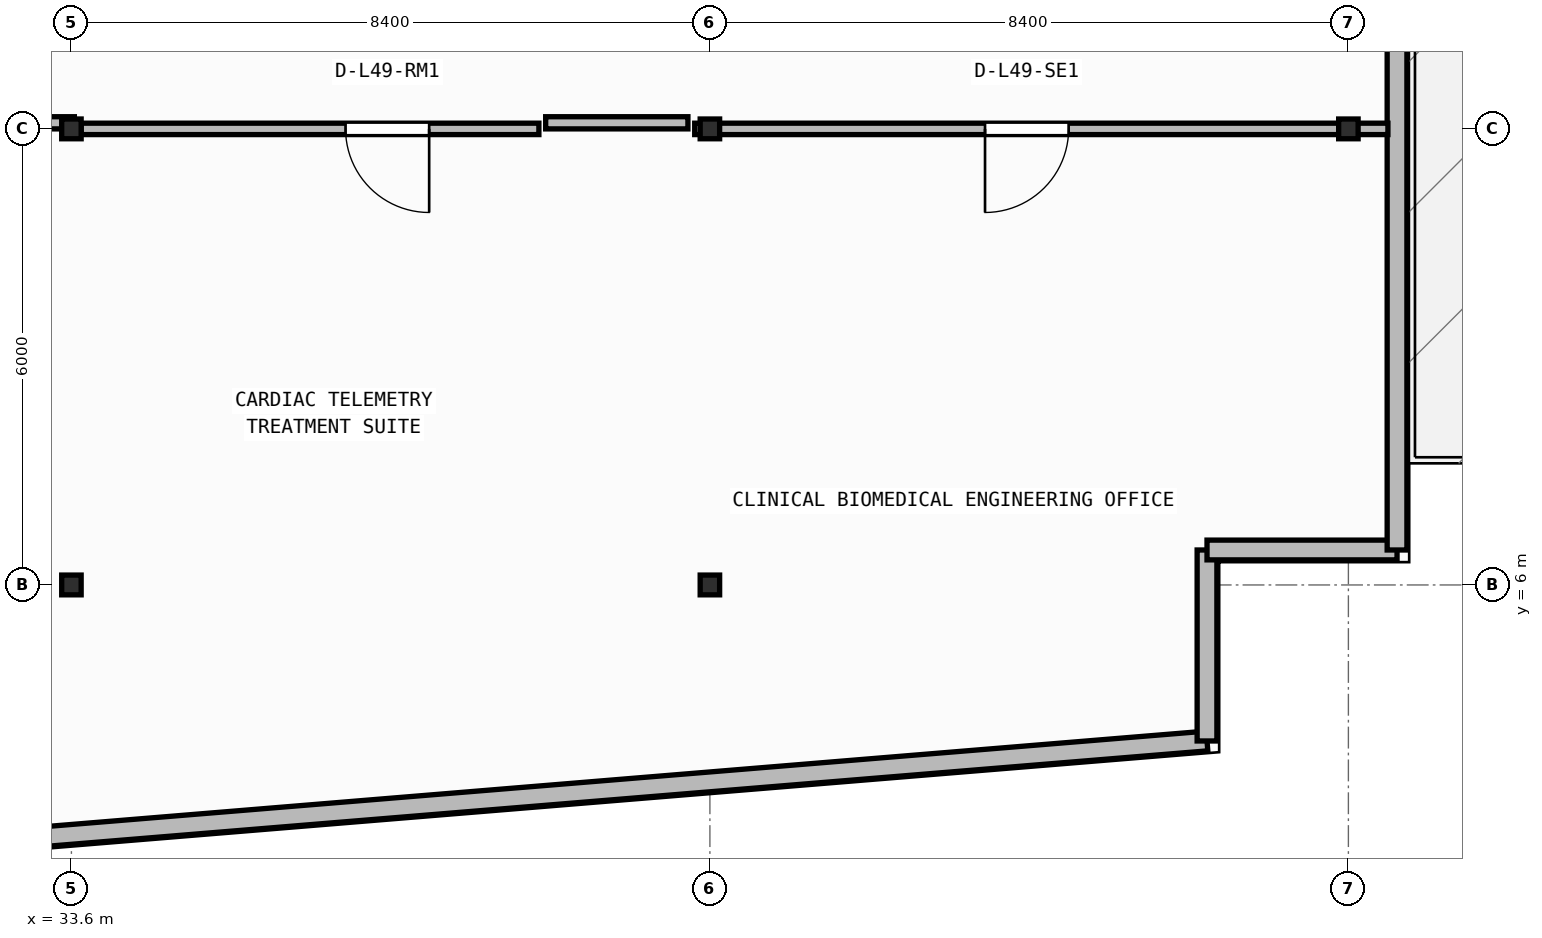
"""IFC4 building model, lengths in metres.
Left out: names, types, materials, properties, quantities, classifications, styles, units other than length and angle.
Written with IfcOpenShell. Run it as: python <this file> out.ifc"""

import sys

from ifc_helpers import new_model, si_unit, direction, frame, frame_2d, origin, origin_2d, place, context, subcontext, project, spatial, rectangle, i_section, extrude, element, fill, save


model = new_model("IFC4")
c1 = context("Model", 3, precision=1e-05, world=origin(), true_north=direction((0.0, 1.0)))
c2 = subcontext(c1, "Body", "Model", "MODEL_VIEW")
j1 = project(units=[si_unit("LENGTHUNIT", "METRE"), si_unit("PLANEANGLEUNIT", "RADIAN")], contexts=[c1])
p1 = place(None, origin())
s1 = spatial("IfcSite", under=j1, at=p1, CompositionType="ELEMENT")
p2 = place(p1, origin())
s2 = spatial("IfcBuilding", under=s1, at=p2, CompositionType="ELEMENT")
p3 = place(p2, frame((0.0, 0.0, 200.0)))
s3 = spatial("IfcBuildingStorey", under=s2, at=p3, CompositionType="ELEMENT", Elevation=200.0)
for number, where, z_axis, x_axis in (
    (1, (33.6, 6.0, 0.0), (0.0, 0.0, 1.0), (1.0, 0.0, 0.0)),
    (2, (42.0, 6.0, 0.0), (0.0, 0.0, 1.0), (1.0, 0.0, 0.0)),
    (3, (33.6, 12.0, 0.0), (0.0, 0.0, 1.0), (1.0, 0.0, 0.0)),
    (4, (42.0, 12.0, 0.0), (0.0, 0.0, 1.0), (1.0, 0.0, 0.0)),
    (5, (50.4, 12.0, 0.0), (0.0, 0.0, 1.0), (1.0, 0.0, 0.0)),
):
    element("IfcColumn", number, at=place(p3, frame(where, z_axis=z_axis, x_axis=x_axis)), inside=s3, PredefinedType="COLUMN", context=c2, shape_type="SweptSolid", body=[
        extrude(i_section(OverallWidth=0.256, OverallDepth=0.26, WebThickness=0.01, FlangeThickness=0.017, FilletRadius=0.013, at=origin_2d()), origin(), (0.0, 0.0, 1.0), 3.95),
    ])
p4 = place(p3, frame((2.66, 0.174, 0.0), z_axis=(0.0, 0.0, 1.0), x_axis=(0.996634028439, 0.081979347142, 0.0)))
e6 = element("IfcWall", 6, at=p4, inside=s3, PredefinedType="STANDARD", context=c2, shape_type="SweptSolid", body=[
    extrude(rectangle(XDim=46.035, YDim=0.26, at=frame_2d((23.018, 0.0))), origin(), (0.0, 0.0, 1.0), 3.71),
])
p5 = place(p4, frame((21.817, 0.0, 0.9)))
e7 = element("IfcOpeningElement", 7, at=p5, cuts=e6, PredefinedType="OPENING", context=c2, shape_type="SweptSolid", body=[
    extrude(rectangle(XDim=2.4, YDim=1.65, at=frame_2d((1.2, 0.825))), frame((0.0, 0.14, 0.0), z_axis=(0.0, -1.0, 0.0), x_axis=(1.0, 0.0, 0.0)), (0.0, 0.0, 1.0), 0.28),
])
p6 = place(p3, frame((48.54, 3.948, 0.0), z_axis=(0.0, 0.0, 1.0), x_axis=(0.0, 1.0, 0.0)))
e8 = element("IfcWall", 8, at=p6, inside=s3, PredefinedType="STANDARD", context=c2, shape_type="SweptSolid", body=[
    extrude(rectangle(XDim=2.512, YDim=0.26, at=frame_2d((1.256, 0.0))), origin(), (0.0, 0.0, 1.0), 3.71),
])
p7 = place(p3, frame((48.54, 6.46, 0.0), z_axis=(0.0, 0.0, 1.0), x_axis=(1.0, 0.0, 0.0)))
e9 = element("IfcWall", 9, at=p7, inside=s3, PredefinedType="STANDARD", context=c2, shape_type="SweptSolid", body=[
    extrude(rectangle(XDim=2.5, YDim=0.26, at=frame_2d((1.25, 0.0))), origin(), (0.0, 0.0, 1.0), 3.71),
])
p8 = place(p3, frame((51.04, 6.46, 0.0), z_axis=(0.0, 0.0, 1.0), x_axis=(0.0, 1.0, 0.0)))
e10 = element("IfcWall", 10, at=p8, inside=s3, PredefinedType="STANDARD", context=c2, shape_type="SweptSolid", body=[
    extrude(rectangle(XDim=22.68, YDim=0.26, at=frame_2d((11.34, 0.0))), origin(), (0.0, 0.0, 1.0), 3.71),
])
p9 = place(p8, frame((10.69, 0.0, 0.0)))
e11 = element("IfcOpeningElement", 11, at=p9, cuts=e10, PredefinedType="OPENING", context=c2, shape_type="SweptSolid", body=[
    extrude(rectangle(XDim=1.3, YDim=2.15, at=frame_2d((0.65, 1.075))), frame((0.0, 0.14, 0.0), z_axis=(0.0, -1.0, 0.0), x_axis=(1.0, 0.0, 0.0)), (0.0, 0.0, 1.0), 0.28),
])
p10 = place(p3, frame((39.75, 12.0, 0.0), z_axis=(0.0, 0.0, 1.0), x_axis=(-1.0, 0.0, 0.0)))
e12 = element("IfcWall", 12, at=p10, inside=s3, PredefinedType="PARTITIONING", context=c2, shape_type="SweptSolid", body=[
    extrude(rectangle(XDim=6.022, YDim=0.15, at=frame_2d((3.011, 0.0))), origin(), (0.0, 0.0, 1.0), 3.152),
])
p11 = place(p10, frame((1.444, 0.0, 0.0)))
e13 = element("IfcOpeningElement", 13, at=p11, cuts=e12, PredefinedType="OPENING", context=c2, shape_type="SweptSolid", body=[
    extrude(rectangle(XDim=1.1, YDim=2.1, at=frame_2d((0.55, 1.05))), frame((0.0, 0.085, 0.0), z_axis=(0.0, -1.0, 0.0), x_axis=(1.0, 0.0, 0.0)), (0.0, 0.0, 1.0), 0.17),
])
p12 = place(p3, frame((50.92, 12.0, 0.0), z_axis=(0.0, 0.0, 1.0), x_axis=(-1.0, 0.0, 0.0)))
e14 = element("IfcWall", 14, at=p12, inside=s3, PredefinedType="PARTITIONING", context=c2, shape_type="SweptSolid", body=[
    extrude(rectangle(XDim=9.12, YDim=0.15, at=frame_2d((4.56, 0.0))), origin(), (0.0, 0.0, 1.0), 3.152),
])
p13 = place(p12, frame((4.2, 0.0, 0.0)))
e15 = element("IfcOpeningElement", 15, at=p13, cuts=e14, PredefinedType="OPENING", context=c2, shape_type="SweptSolid", body=[
    extrude(rectangle(XDim=1.1, YDim=2.1, at=frame_2d((0.55, 1.05))), frame((0.0, 0.085, 0.0), z_axis=(0.0, -1.0, 0.0), x_axis=(1.0, 0.0, 0.0)), (0.0, 0.0, 1.0), 0.17),
])
p14 = place(p3, frame((31.439, 12.08, 0.0), z_axis=(0.0, 0.0, 1.0), x_axis=(1.0, 0.0, 0.0)))
e16 = element("IfcWall", 16, at=p14, inside=s3, PredefinedType="PARTITIONING", context=c2, shape_type="SweptSolid", body=[
    extrude(rectangle(XDim=2.199, YDim=0.16, at=frame_2d((1.1, 0.0))), origin(), (0.0, 0.0, 1.0), 3.152),
])
p15 = place(p3, frame((39.839, 12.08, 0.0), z_axis=(0.0, 0.0, 1.0), x_axis=(1.0, 0.0, 0.0)))
e17 = element("IfcWall", 17, at=p15, inside=s3, PredefinedType="PARTITIONING", context=c2, shape_type="SweptSolid", body=[
    extrude(rectangle(XDim=1.871, YDim=0.16, at=frame_2d((0.936, 0.0))), origin(), (0.0, 0.0, 1.0), 3.152),
])
p16 = place(p11, origin())
e18 = element("IfcDoor", 18, at=p16, inside=s3, OperationType="SINGLE_SWING_LEFT", PredefinedType="DOOR", context=c2, shape_type="SweptSolid", body=[
    extrude(rectangle(XDim=1.1, YDim=2.1, at=frame_2d((0.55, 1.05))), frame((0.0, 0.025, 0.0), z_axis=(0.0, -1.0, 0.0), x_axis=(1.0, 0.0, 0.0)), (0.0, 0.0, 1.0), 0.05),
])
fill(e13, e18)
p17 = place(p13, origin())
e19 = element("IfcDoor", 19, at=p17, inside=s3, OperationType="SINGLE_SWING_RIGHT", PredefinedType="DOOR", context=c2, shape_type="SweptSolid", body=[
    extrude(rectangle(XDim=1.1, YDim=2.1, at=frame_2d((0.55, 1.05))), frame((0.0, 0.025, 0.0), z_axis=(0.0, -1.0, 0.0), x_axis=(1.0, 0.0, 0.0)), (0.0, 0.0, 1.0), 0.05),
])
fill(e15, e19)
save(model, sys.argv[1])
